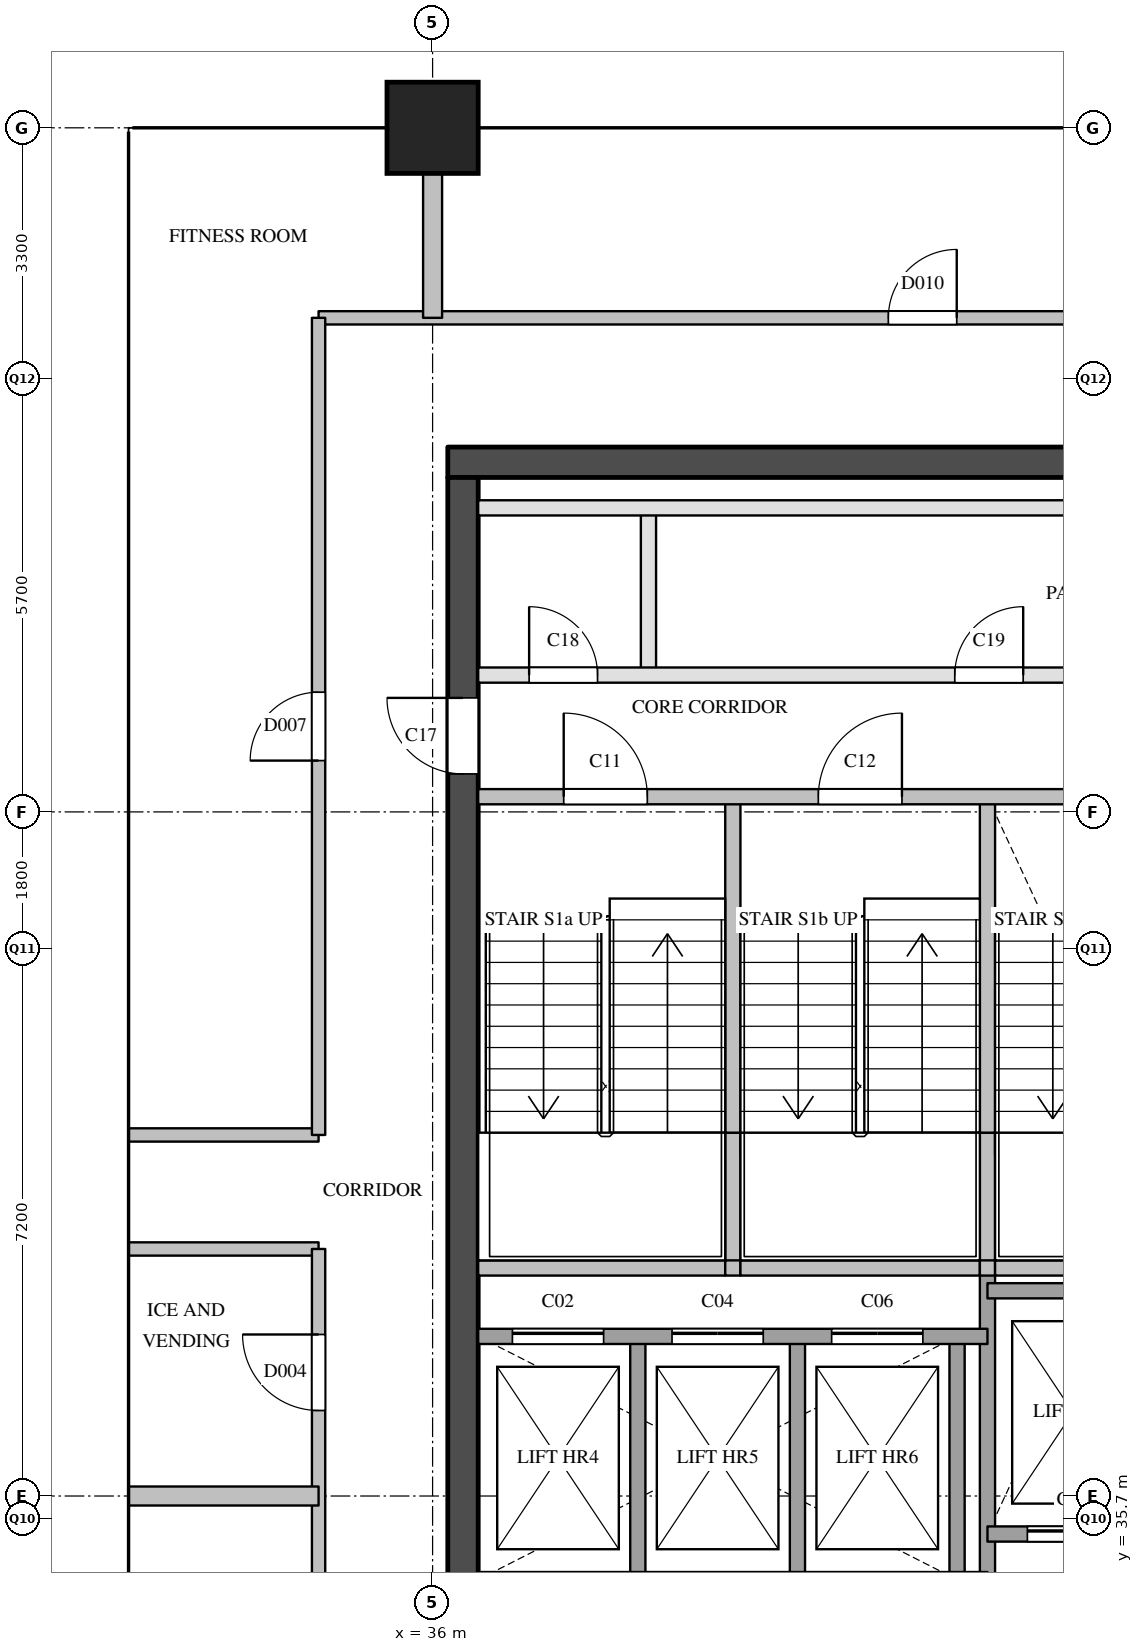
"""IFC4 building model, lengths in metres.
Left out: names, types, materials, properties, quantities, classifications, styles, units other than length and angle.
Written with IfcOpenShell. Run it as: python <this file> out.ifc"""

import sys

from ifc_helpers import new_model, si_unit, direction, frame, frame_2d, origin, origin_2d, place, context, subcontext, project, spatial, rectangle, extrude, element, fill, save


model = new_model("IFC4")
c1 = context("Model", 3, precision=1e-05, world=origin(), true_north=direction((0.0, 1.0)))
c2 = subcontext(c1, "Body", "Model", "MODEL_VIEW")
j1 = project(units=[si_unit("LENGTHUNIT", "METRE"), si_unit("PLANEANGLEUNIT", "RADIAN")], contexts=[c1])
p1 = place(None, origin())
s1 = spatial("IfcSite", under=j1, at=p1, CompositionType="ELEMENT")
p2 = place(p1, origin())
s2 = spatial("IfcBuilding", under=s1, at=p2, CompositionType="ELEMENT")
p3 = place(p2, frame((0.0, 0.0, 211.1)))
s3 = spatial("IfcBuildingStorey", under=s2, at=p3, CompositionType="ELEMENT", Elevation=211.1)
p4 = place(p3, frame((36.0, 54.0, 0.0), z_axis=(0.0, 0.0, 1.0), x_axis=(1.0, 0.0, 0.0)))
e1 = element("IfcColumn", 1, at=p4, inside=s3, PredefinedType="COLUMN", context=c2, shape_type="SweptSolid", body=[
    extrude(rectangle(XDim=1.2, YDim=1.2, at=origin_2d()), origin(), (0.0, 0.0, 1.0), 3.9),
])
p5 = place(p3, frame((36.2, 49.6, 0.0), z_axis=(0.0, 0.0, 1.0), x_axis=(1.0, 0.0, 0.0)))
e2 = element("IfcWall", 2, at=p5, inside=s3, PredefinedType="SHEAR", context=c2, shape_type="SweptSolid", body=[
    extrude(rectangle(XDim=12.0, YDim=0.4, at=frame_2d((6.0, 0.0))), origin(), (0.0, 0.0, 1.0), 3.6),
])
p6 = place(p3, frame((36.4, 29.1, 0.0), z_axis=(0.0, 0.0, 1.0), x_axis=(0.0, 1.0, 0.0)))
e3 = element("IfcWall", 3, at=p6, inside=s3, PredefinedType="SHEAR", context=c2, shape_type="SweptSolid", body=[
    extrude(rectangle(XDim=20.3, YDim=0.4, at=frame_2d((10.15, 0.0))), origin(), (0.0, 0.0, 1.0), 3.6),
])
p7 = place(p6, frame((3.6, 0.0, 0.0)))
e4 = element("IfcOpeningElement", 4, at=p7, cuts=e3, PredefinedType="OPENING", context=c2, shape_type="SweptSolid", body=[
    extrude(rectangle(XDim=1.8, YDim=2.1, at=frame_2d((0.9, 1.05))), frame((0.0, 0.21, 0.0), z_axis=(0.0, -1.0, 0.0), x_axis=(1.0, 0.0, 0.0)), (0.0, 0.0, 1.0), 0.42),
])
p8 = place(p6, frame((16.4, 0.0, 0.0)))
e5 = element("IfcOpeningElement", 5, at=p8, cuts=e3, PredefinedType="OPENING", context=c2, shape_type="SweptSolid", body=[
    extrude(rectangle(XDim=1.0, YDim=2.1, at=frame_2d((0.5, 1.05))), frame((0.0, 0.21, 0.0), z_axis=(0.0, -1.0, 0.0), x_axis=(1.0, 0.0, 0.0)), (0.0, 0.0, 1.0), 0.42),
])
p9 = place(p3, frame((38.7, 34.9, 0.0), z_axis=(0.0, 0.0, 1.0), x_axis=(0.0, 1.0, 0.0)))
e6 = element("IfcWall", 6, at=p9, inside=s3, PredefinedType="SOLIDWALL", context=c2, shape_type="SweptSolid", body=[
    extrude(rectangle(XDim=3.2, YDim=0.2, at=frame_2d((1.6, 0.0))), origin(), (0.0, 0.0, 1.0), 3.6),
])
p10 = place(p3, frame((38.84, 46.8, 0.0), z_axis=(0.0, 0.0, 1.0), x_axis=(0.0, 1.0, 0.0)))
e7 = element("IfcWall", 7, at=p10, inside=s3, PredefinedType="PARTITIONING", context=c2, shape_type="SweptSolid", body=[
    extrude(rectangle(XDim=2.2, YDim=0.2, at=frame_2d((1.1, 0.0))), origin(), (0.0, 0.0, 1.0), 3.6),
])
p11 = place(p3, frame((39.95, 39.0, 0.0), z_axis=(0.0, 0.0, 1.0), x_axis=(0.0, 1.0, 0.0)))
e8 = element("IfcWall", 8, at=p11, inside=s3, PredefinedType="SOLIDWALL", context=c2, shape_type="SweptSolid", body=[
    extrude(rectangle(XDim=1.78, YDim=0.2, at=frame_2d((0.89, 0.0))), origin(), (0.0, 0.0, 1.0), 3.6),
])
p12 = place(p3, frame((39.95, 40.78, 0.0), z_axis=(0.0, 0.0, 1.0), x_axis=(0.0, 1.0, 0.0)))
e9 = element("IfcWall", 9, at=p12, inside=s3, PredefinedType="SOLIDWALL", context=c2, shape_type="SweptSolid", body=[
    extrude(rectangle(XDim=4.42, YDim=0.2, at=frame_2d((2.21, 0.0))), origin(), (0.0, 0.0, 1.0), 3.6),
])
for number, where, z_axis, x_axis in (
    (10, (40.8, 34.9, 0.0), (0.0, 0.0, 1.0), (0.0, 1.0, 0.0)),
    (11, (42.9, 34.9, 0.0), (0.0, 0.0, 1.0), (0.0, 1.0, 0.0)),
):
    element("IfcWall", number, at=place(p3, frame(where, z_axis=z_axis, x_axis=x_axis)), inside=s3, PredefinedType="SOLIDWALL", context=c2, shape_type="SweptSolid", body=[
        extrude(rectangle(XDim=3.2, YDim=0.2, at=frame_2d((1.6, 0.0))), origin(), (0.0, 0.0, 1.0), 3.6),
    ])
p13 = place(p3, frame((43.3, 29.1, 0.0), z_axis=(0.0, 0.0, 1.0), x_axis=(0.0, 1.0, 0.0)))
e12 = element("IfcWall", 12, at=p13, inside=s3, PredefinedType="SOLIDWALL", context=c2, shape_type="SweptSolid", body=[
    extrude(rectangle(XDim=9.9, YDim=0.2, at=frame_2d((4.95, 0.0))), origin(), (0.0, 0.0, 1.0), 3.6),
])
p14 = place(p3, frame((43.3, 39.0, 0.0), z_axis=(0.0, 0.0, 1.0), x_axis=(0.0, 1.0, 0.0)))
e13 = element("IfcWall", 13, at=p14, inside=s3, PredefinedType="SOLIDWALL", context=c2, shape_type="SweptSolid", body=[
    extrude(rectangle(XDim=1.78, YDim=0.2, at=frame_2d((0.89, 0.0))), origin(), (0.0, 0.0, 1.0), 3.6),
])
p15 = place(p3, frame((43.3, 40.78, 0.0), z_axis=(0.0, 0.0, 1.0), x_axis=(0.0, 1.0, 0.0)))
e14 = element("IfcWall", 14, at=p15, inside=s3, PredefinedType="SOLIDWALL", context=c2, shape_type="SweptSolid", body=[
    extrude(rectangle(XDim=4.42, YDim=0.2, at=frame_2d((2.21, 0.0))), origin(), (0.0, 0.0, 1.0), 3.6),
])
p16 = place(p3, frame((43.3, 35.5, 0.0), z_axis=(0.0, 0.0, 1.0), x_axis=(1.0, 0.0, 0.0)))
e15 = element("IfcWall", 15, at=p16, inside=s3, PredefinedType="SOLIDWALL", context=c2, shape_type="SweptSolid", body=[
    extrude(rectangle(XDim=4.5, YDim=0.2, at=frame_2d((2.25, 0.0))), origin(), (0.0, 0.0, 1.0), 3.6),
])
p17 = place(p16, frame((0.525, 0.0, 0.0)))
e16 = element("IfcOpeningElement", 16, at=p17, cuts=e15, PredefinedType="OPENING", context=c2, shape_type="SweptSolid", body=[
    extrude(rectangle(XDim=1.2, YDim=2.1, at=frame_2d((0.6, 1.05))), frame((0.0, 0.11, 0.0), z_axis=(0.0, -1.0, 0.0), x_axis=(1.0, 0.0, 0.0)), (0.0, 0.0, 1.0), 0.22),
])
p18 = place(p16, frame((3.025, 0.0, 0.0)))
e17 = element("IfcOpeningElement", 17, at=p18, cuts=e15, PredefinedType="OPENING", context=c2, shape_type="SweptSolid", body=[
    extrude(rectangle(XDim=0.7, YDim=2.1, at=frame_2d((0.35, 1.05))), frame((0.0, 0.11, 0.0), z_axis=(0.0, -1.0, 0.0), x_axis=(1.0, 0.0, 0.0)), (0.0, 0.0, 1.0), 0.22),
])
p19 = place(p3, frame((36.6, 38.1, 0.0), z_axis=(0.0, 0.0, 1.0), x_axis=(1.0, 0.0, 0.0)))
e18 = element("IfcWall", 18, at=p19, inside=s3, PredefinedType="SOLIDWALL", context=c2, shape_type="SweptSolid", body=[
    extrude(rectangle(XDim=6.7, YDim=0.2, at=frame_2d((3.35, 0.0))), origin(), (0.0, 0.0, 1.0), 3.6),
])
p20 = place(p19, frame((0.45, 0.0, 0.0)))
e19 = element("IfcOpeningElement", 19, at=p20, cuts=e18, PredefinedType="OPENING", context=c2, shape_type="SweptSolid", body=[
    extrude(rectangle(XDim=1.2, YDim=2.1, at=frame_2d((0.6, 1.05))), frame((0.0, 0.11, 0.0), z_axis=(0.0, -1.0, 0.0), x_axis=(1.0, 0.0, 0.0)), (0.0, 0.0, 1.0), 0.22),
])
p21 = place(p19, frame((2.55, 0.0, 0.0)))
e20 = element("IfcOpeningElement", 20, at=p21, cuts=e18, PredefinedType="OPENING", context=c2, shape_type="SweptSolid", body=[
    extrude(rectangle(XDim=1.2, YDim=2.1, at=frame_2d((0.6, 1.05))), frame((0.0, 0.11, 0.0), z_axis=(0.0, -1.0, 0.0), x_axis=(1.0, 0.0, 0.0)), (0.0, 0.0, 1.0), 0.22),
])
p22 = place(p19, frame((4.65, 0.0, 0.0)))
e21 = element("IfcOpeningElement", 21, at=p22, cuts=e18, PredefinedType="OPENING", context=c2, shape_type="SweptSolid", body=[
    extrude(rectangle(XDim=1.2, YDim=2.1, at=frame_2d((0.6, 1.05))), frame((0.0, 0.11, 0.0), z_axis=(0.0, -1.0, 0.0), x_axis=(1.0, 0.0, 0.0)), (0.0, 0.0, 1.0), 0.22),
])
p23 = place(p3, frame((43.3, 38.7, 0.0), z_axis=(0.0, 0.0, 1.0), x_axis=(1.0, 0.0, 0.0)))
e22 = element("IfcWall", 22, at=p23, inside=s3, PredefinedType="SOLIDWALL", context=c2, shape_type="SweptSolid", body=[
    extrude(rectangle(XDim=4.5, YDim=0.2, at=frame_2d((2.25, 0.0))), origin(), (0.0, 0.0, 1.0), 3.6),
])
p24 = place(p3, frame((36.6, 39.0, 0.0), z_axis=(0.0, 0.0, 1.0), x_axis=(1.0, 0.0, 0.0)))
e23 = element("IfcWall", 23, at=p24, inside=s3, PredefinedType="SOLIDWALL", context=c2, shape_type="SweptSolid", body=[
    extrude(rectangle(XDim=3.25, YDim=0.2, at=frame_2d((1.625, 0.0))), origin(), (0.0, 0.0, 1.0), 3.6),
])
p25 = place(p3, frame((39.85, 39.0, 0.0), z_axis=(0.0, 0.0, 1.0), x_axis=(1.0, 0.0, 0.0)))
e24 = element("IfcWall", 24, at=p25, inside=s3, PredefinedType="SOLIDWALL", context=c2, shape_type="SweptSolid", body=[
    extrude(rectangle(XDim=0.2, YDim=0.2, at=frame_2d((0.1, 0.0))), origin(), (0.0, 0.0, 1.0), 3.6),
])
p26 = place(p3, frame((40.05, 39.0, 0.0), z_axis=(0.0, 0.0, 1.0), x_axis=(1.0, 0.0, 0.0)))
e25 = element("IfcWall", 25, at=p26, inside=s3, PredefinedType="SOLIDWALL", context=c2, shape_type="SweptSolid", body=[
    extrude(rectangle(XDim=3.15, YDim=0.2, at=frame_2d((1.575, 0.0))), origin(), (0.0, 0.0, 1.0), 3.6),
])
p27 = place(p3, frame((43.2, 39.0, 0.0), z_axis=(0.0, 0.0, 1.0), x_axis=(1.0, 0.0, 0.0)))
e26 = element("IfcWall", 26, at=p27, inside=s3, PredefinedType="SOLIDWALL", context=c2, shape_type="SweptSolid", body=[
    extrude(rectangle(XDim=0.2, YDim=0.2, at=frame_2d((0.1, 0.0))), origin(), (0.0, 0.0, 1.0), 3.6),
])
p28 = place(p3, frame((43.4, 39.0, 0.0), z_axis=(0.0, 0.0, 1.0), x_axis=(1.0, 0.0, 0.0)))
e27 = element("IfcWall", 27, at=p28, inside=s3, PredefinedType="SOLIDWALL", context=c2, shape_type="SweptSolid", body=[
    extrude(rectangle(XDim=3.25, YDim=0.2, at=frame_2d((1.625, 0.0))), origin(), (0.0, 0.0, 1.0), 3.6),
])
p29 = place(p3, frame((36.6, 45.2, 0.0), z_axis=(0.0, 0.0, 1.0), x_axis=(1.0, 0.0, 0.0)))
e28 = element("IfcWall", 28, at=p29, inside=s3, PredefinedType="SOLIDWALL", context=c2, shape_type="SweptSolid", body=[
    extrude(rectangle(XDim=10.05, YDim=0.2, at=frame_2d((5.025, 0.0))), origin(), (0.0, 0.0, 1.0), 3.6),
])
p30 = place(p29, frame((1.125, 0.0, 0.0)))
e29 = element("IfcOpeningElement", 29, at=p30, cuts=e28, PredefinedType="OPENING", context=c2, shape_type="SweptSolid", body=[
    extrude(rectangle(XDim=1.1, YDim=2.1, at=frame_2d((0.55, 1.05))), frame((0.0, 0.11, 0.0), z_axis=(0.0, -1.0, 0.0), x_axis=(1.0, 0.0, 0.0)), (0.0, 0.0, 1.0), 0.22),
])
p31 = place(p29, frame((4.475, 0.0, 0.0)))
e30 = element("IfcOpeningElement", 30, at=p31, cuts=e28, PredefinedType="OPENING", context=c2, shape_type="SweptSolid", body=[
    extrude(rectangle(XDim=1.1, YDim=2.1, at=frame_2d((0.55, 1.05))), frame((0.0, 0.11, 0.0), z_axis=(0.0, -1.0, 0.0), x_axis=(1.0, 0.0, 0.0)), (0.0, 0.0, 1.0), 0.22),
])
p32 = place(p29, frame((7.825, 0.0, 0.0)))
e31 = element("IfcOpeningElement", 31, at=p32, cuts=e28, PredefinedType="OPENING", context=c2, shape_type="SweptSolid", body=[
    extrude(rectangle(XDim=1.1, YDim=2.1, at=frame_2d((0.55, 1.05))), frame((0.0, 0.11, 0.0), z_axis=(0.0, -1.0, 0.0), x_axis=(1.0, 0.0, 0.0)), (0.0, 0.0, 1.0), 0.22),
])
p33 = place(p3, frame((36.6, 46.8, 0.0), z_axis=(0.0, 0.0, 1.0), x_axis=(1.0, 0.0, 0.0)))
e32 = element("IfcWall", 32, at=p33, inside=s3, PredefinedType="PARTITIONING", context=c2, shape_type="SweptSolid", body=[
    extrude(rectangle(XDim=11.2, YDim=0.2, at=frame_2d((5.6, 0.0))), origin(), (0.0, 0.0, 1.0), 3.6),
])
p34 = place(p33, frame((0.67, 0.0, 0.0)))
e33 = element("IfcOpeningElement", 33, at=p34, cuts=e32, PredefinedType="OPENING", context=c2, shape_type="SweptSolid", body=[
    extrude(rectangle(XDim=0.9, YDim=2.1, at=frame_2d((0.45, 1.05))), frame((0.0, 0.11, 0.0), z_axis=(0.0, -1.0, 0.0), x_axis=(1.0, 0.0, 0.0)), (0.0, 0.0, 1.0), 0.22),
])
p35 = place(p33, frame((6.27, 0.0, 0.0)))
e34 = element("IfcOpeningElement", 34, at=p35, cuts=e32, PredefinedType="OPENING", context=c2, shape_type="SweptSolid", body=[
    extrude(rectangle(XDim=0.9, YDim=2.1, at=frame_2d((0.45, 1.05))), frame((0.0, 0.11, 0.0), z_axis=(0.0, -1.0, 0.0), x_axis=(1.0, 0.0, 0.0)), (0.0, 0.0, 1.0), 0.22),
])
p36 = place(p3, frame((36.6, 49.0, 0.0), z_axis=(0.0, 0.0, 1.0), x_axis=(1.0, 0.0, 0.0)))
e35 = element("IfcWall", 35, at=p36, inside=s3, PredefinedType="PARTITIONING", context=c2, shape_type="SweptSolid", body=[
    extrude(rectangle(XDim=11.2, YDim=0.2, at=frame_2d((5.6, 0.0))), origin(), (0.0, 0.0, 1.0), 3.6),
])
for number, where, z_axis, x_axis in (
    (36, (32.0, 39.25, 0.0), (0.0, 0.0, 1.0), (1.0, 0.0, 0.0)),
    (37, (32.0, 40.75, 0.0), (0.0, 0.0, 1.0), (1.0, 0.0, 0.0)),
):
    element("IfcWall", number, at=place(p3, frame(where, z_axis=z_axis, x_axis=x_axis)), inside=s3, PredefinedType="PARTITIONING", context=c2, shape_type="SweptSolid", body=[
        extrude(rectangle(XDim=2.5, YDim=0.175, at=frame_2d((1.25, 0.0))), origin(), (0.0, 0.0, 1.0), 3.6),
    ])
p37 = place(p3, frame((34.5, 51.5, 0.0), z_axis=(0.0, 0.0, 1.0), x_axis=(1.0, 0.0, 0.0)))
e38 = element("IfcWall", 38, at=p37, inside=s3, PredefinedType="PARTITIONING", context=c2, shape_type="SweptSolid", body=[
    extrude(rectangle(XDim=15.4, YDim=0.175, at=frame_2d((7.7, 0.0))), origin(), (0.0, 0.0, 1.0), 3.6),
])
p38 = place(p37, frame((7.496, 0.0, 0.0)))
e39 = element("IfcOpeningElement", 39, at=p38, cuts=e38, PredefinedType="OPENING", context=c2, shape_type="SweptSolid", body=[
    extrude(rectangle(XDim=0.9, YDim=2.1, at=frame_2d((0.45, 1.05))), frame((0.0, 0.097, 0.0), z_axis=(0.0, -1.0, 0.0), x_axis=(1.0, 0.0, 0.0)), (0.0, 0.0, 1.0), 0.195),
])
p39 = place(p3, frame((34.5, 28.5, 0.0), z_axis=(0.0, 0.0, 1.0), x_axis=(0.0, 1.0, 0.0)))
e40 = element("IfcWall", 40, at=p39, inside=s3, PredefinedType="PARTITIONING", context=c2, shape_type="SweptSolid", body=[
    extrude(rectangle(XDim=10.75, YDim=0.175, at=frame_2d((5.375, 0.0))), origin(), (0.0, 0.0, 1.0), 3.6),
])
p40 = place(p39, frame((3.3, 0.0, 0.0)))
e41 = element("IfcOpeningElement", 41, at=p40, cuts=e40, PredefinedType="OPENING", context=c2, shape_type="SweptSolid", body=[
    extrude(rectangle(XDim=0.9, YDim=2.1, at=frame_2d((0.45, 1.05))), frame((0.0, 0.097, 0.0), z_axis=(0.0, -1.0, 0.0), x_axis=(1.0, 0.0, 0.0)), (0.0, 0.0, 1.0), 0.195),
])
p41 = place(p39, frame((8.625, 0.0, 0.0)))
e42 = element("IfcOpeningElement", 42, at=p41, cuts=e40, PredefinedType="OPENING", context=c2, shape_type="SweptSolid", body=[
    extrude(rectangle(XDim=1.0, YDim=2.1, at=frame_2d((0.5, 1.05))), frame((0.0, 0.097, 0.0), z_axis=(0.0, -1.0, 0.0), x_axis=(1.0, 0.0, 0.0)), (0.0, 0.0, 1.0), 0.195),
])
p42 = place(p3, frame((34.5, 40.75, 0.0), z_axis=(0.0, 0.0, 1.0), x_axis=(0.0, 1.0, 0.0)))
e43 = element("IfcWall", 43, at=p42, inside=s3, PredefinedType="PARTITIONING", context=c2, shape_type="SweptSolid", body=[
    extrude(rectangle(XDim=10.75, YDim=0.175, at=frame_2d((5.375, 0.0))), origin(), (0.0, 0.0, 1.0), 3.6),
])
p43 = place(p42, frame((4.925, 0.0, 0.0)))
e44 = element("IfcOpeningElement", 44, at=p43, cuts=e43, PredefinedType="OPENING", context=c2, shape_type="SweptSolid", body=[
    extrude(rectangle(XDim=0.9, YDim=2.1, at=frame_2d((0.45, 1.05))), frame((0.0, 0.097, 0.0), z_axis=(0.0, -1.0, 0.0), x_axis=(1.0, 0.0, 0.0)), (0.0, 0.0, 1.0), 0.195),
])
for number, where, z_axis, x_axis in (
    (45, (32.0, 36.0, 0.0), (0.0, 0.0, 1.0), (1.0, 0.0, 0.0)),
    (46, (36.0, 51.5, 0.0), (0.0, 0.0, 1.0), (0.0, 1.0, 0.0)),
):
    element("IfcWall", number, at=place(p3, frame(where, z_axis=z_axis, x_axis=x_axis)), inside=s3, PredefinedType="PARTITIONING", context=c2, shape_type="SweptSolid", body=[
        extrude(rectangle(XDim=2.5, YDim=0.25, at=frame_2d((1.25, 0.0))), origin(), (0.0, 0.0, 1.0), 3.6),
    ])
p44 = place(p20, origin())
e47 = element("IfcDoor", 47, at=p44, inside=s3, OperationType="SLIDING_TO_LEFT", PredefinedType="DOOR", context=c2, shape_type="SweptSolid", body=[
    extrude(rectangle(XDim=1.2, YDim=2.1, at=frame_2d((0.6, 1.05))), frame((0.0, 0.025, 0.0), z_axis=(0.0, -1.0, 0.0), x_axis=(1.0, 0.0, 0.0)), (0.0, 0.0, 1.0), 0.05),
])
fill(e19, e47)
p45 = place(p21, origin())
e48 = element("IfcDoor", 48, at=p45, inside=s3, OperationType="SLIDING_TO_LEFT", PredefinedType="DOOR", context=c2, shape_type="SweptSolid", body=[
    extrude(rectangle(XDim=1.2, YDim=2.1, at=frame_2d((0.6, 1.05))), frame((0.0, 0.025, 0.0), z_axis=(0.0, -1.0, 0.0), x_axis=(1.0, 0.0, 0.0)), (0.0, 0.0, 1.0), 0.05),
])
fill(e20, e48)
p46 = place(p22, origin())
e49 = element("IfcDoor", 49, at=p46, inside=s3, OperationType="SLIDING_TO_LEFT", PredefinedType="DOOR", context=c2, shape_type="SweptSolid", body=[
    extrude(rectangle(XDim=1.2, YDim=2.1, at=frame_2d((0.6, 1.05))), frame((0.0, 0.025, 0.0), z_axis=(0.0, -1.0, 0.0), x_axis=(1.0, 0.0, 0.0)), (0.0, 0.0, 1.0), 0.05),
])
fill(e21, e49)
p47 = place(p17, origin())
e50 = element("IfcDoor", 50, at=p47, inside=s3, OperationType="SLIDING_TO_LEFT", PredefinedType="DOOR", context=c2, shape_type="SweptSolid", body=[
    extrude(rectangle(XDim=1.2, YDim=2.1, at=frame_2d((0.6, 1.05))), frame((0.0, 0.025, 0.0), z_axis=(0.0, -1.0, 0.0), x_axis=(1.0, 0.0, 0.0)), (0.0, 0.0, 1.0), 0.05),
])
fill(e16, e50)
p48 = place(p30, origin())
e51 = element("IfcDoor", 51, at=p48, inside=s3, OperationType="SINGLE_SWING_LEFT", PredefinedType="DOOR", context=c2, shape_type="SweptSolid", body=[
    extrude(rectangle(XDim=1.1, YDim=2.1, at=frame_2d((0.55, 1.05))), frame((0.0, 0.025, 0.0), z_axis=(0.0, -1.0, 0.0), x_axis=(1.0, 0.0, 0.0)), (0.0, 0.0, 1.0), 0.05),
])
fill(e29, e51)
p49 = place(p31, origin())
e52 = element("IfcDoor", 52, at=p49, inside=s3, OperationType="SINGLE_SWING_RIGHT", PredefinedType="DOOR", context=c2, shape_type="SweptSolid", body=[
    extrude(rectangle(XDim=1.1, YDim=2.1, at=frame_2d((0.55, 1.05))), frame((0.0, 0.025, 0.0), z_axis=(0.0, -1.0, 0.0), x_axis=(1.0, 0.0, 0.0)), (0.0, 0.0, 1.0), 0.05),
])
fill(e30, e52)
p50 = place(p8, origin())
e53 = element("IfcDoor", 53, at=p50, inside=s3, OperationType="SINGLE_SWING_RIGHT", PredefinedType="DOOR", context=c2, shape_type="SweptSolid", body=[
    extrude(rectangle(XDim=1.0, YDim=2.1, at=frame_2d((0.5, 1.05))), frame((0.0, 0.025, 0.0), z_axis=(0.0, -1.0, 0.0), x_axis=(1.0, 0.0, 0.0)), (0.0, 0.0, 1.0), 0.05),
])
fill(e5, e53)
p51 = place(p34, origin())
e54 = element("IfcDoor", 54, at=p51, inside=s3, OperationType="SINGLE_SWING_LEFT", PredefinedType="DOOR", context=c2, shape_type="SweptSolid", body=[
    extrude(rectangle(XDim=0.9, YDim=2.1, at=frame_2d((0.45, 1.05))), frame((0.0, 0.025, 0.0), z_axis=(0.0, -1.0, 0.0), x_axis=(1.0, 0.0, 0.0)), (0.0, 0.0, 1.0), 0.05),
])
fill(e33, e54)
p52 = place(p35, origin())
e55 = element("IfcDoor", 55, at=p52, inside=s3, OperationType="SINGLE_SWING_RIGHT", PredefinedType="DOOR", context=c2, shape_type="SweptSolid", body=[
    extrude(rectangle(XDim=0.9, YDim=2.1, at=frame_2d((0.45, 1.05))), frame((0.0, 0.025, 0.0), z_axis=(0.0, -1.0, 0.0), x_axis=(1.0, 0.0, 0.0)), (0.0, 0.0, 1.0), 0.05),
])
fill(e34, e55)
p53 = place(p41, origin())
e56 = element("IfcDoor", 56, at=p53, inside=s3, OperationType="SINGLE_SWING_RIGHT", PredefinedType="DOOR", context=c2, shape_type="SweptSolid", body=[
    extrude(rectangle(XDim=1.0, YDim=2.1, at=frame_2d((0.5, 1.05))), frame((0.0, 0.025, 0.0), z_axis=(0.0, -1.0, 0.0), x_axis=(1.0, 0.0, 0.0)), (0.0, 0.0, 1.0), 0.05),
])
fill(e42, e56)
p54 = place(p43, origin())
e57 = element("IfcDoor", 57, at=p54, inside=s3, OperationType="SINGLE_SWING_LEFT", PredefinedType="DOOR", context=c2, shape_type="SweptSolid", body=[
    extrude(rectangle(XDim=0.9, YDim=2.1, at=frame_2d((0.45, 1.05))), frame((0.0, 0.025, 0.0), z_axis=(0.0, -1.0, 0.0), x_axis=(1.0, 0.0, 0.0)), (0.0, 0.0, 1.0), 0.05),
])
fill(e44, e57)
p55 = place(p38, origin())
e58 = element("IfcDoor", 58, at=p55, inside=s3, OperationType="SINGLE_SWING_RIGHT", PredefinedType="DOOR", context=c2, shape_type="SweptSolid", body=[
    extrude(rectangle(XDim=0.9, YDim=2.1, at=frame_2d((0.45, 1.05))), frame((0.0, 0.025, 0.0), z_axis=(0.0, -1.0, 0.0), x_axis=(1.0, 0.0, 0.0)), (0.0, 0.0, 1.0), 0.05),
])
fill(e39, e58)
save(model, sys.argv[1])
